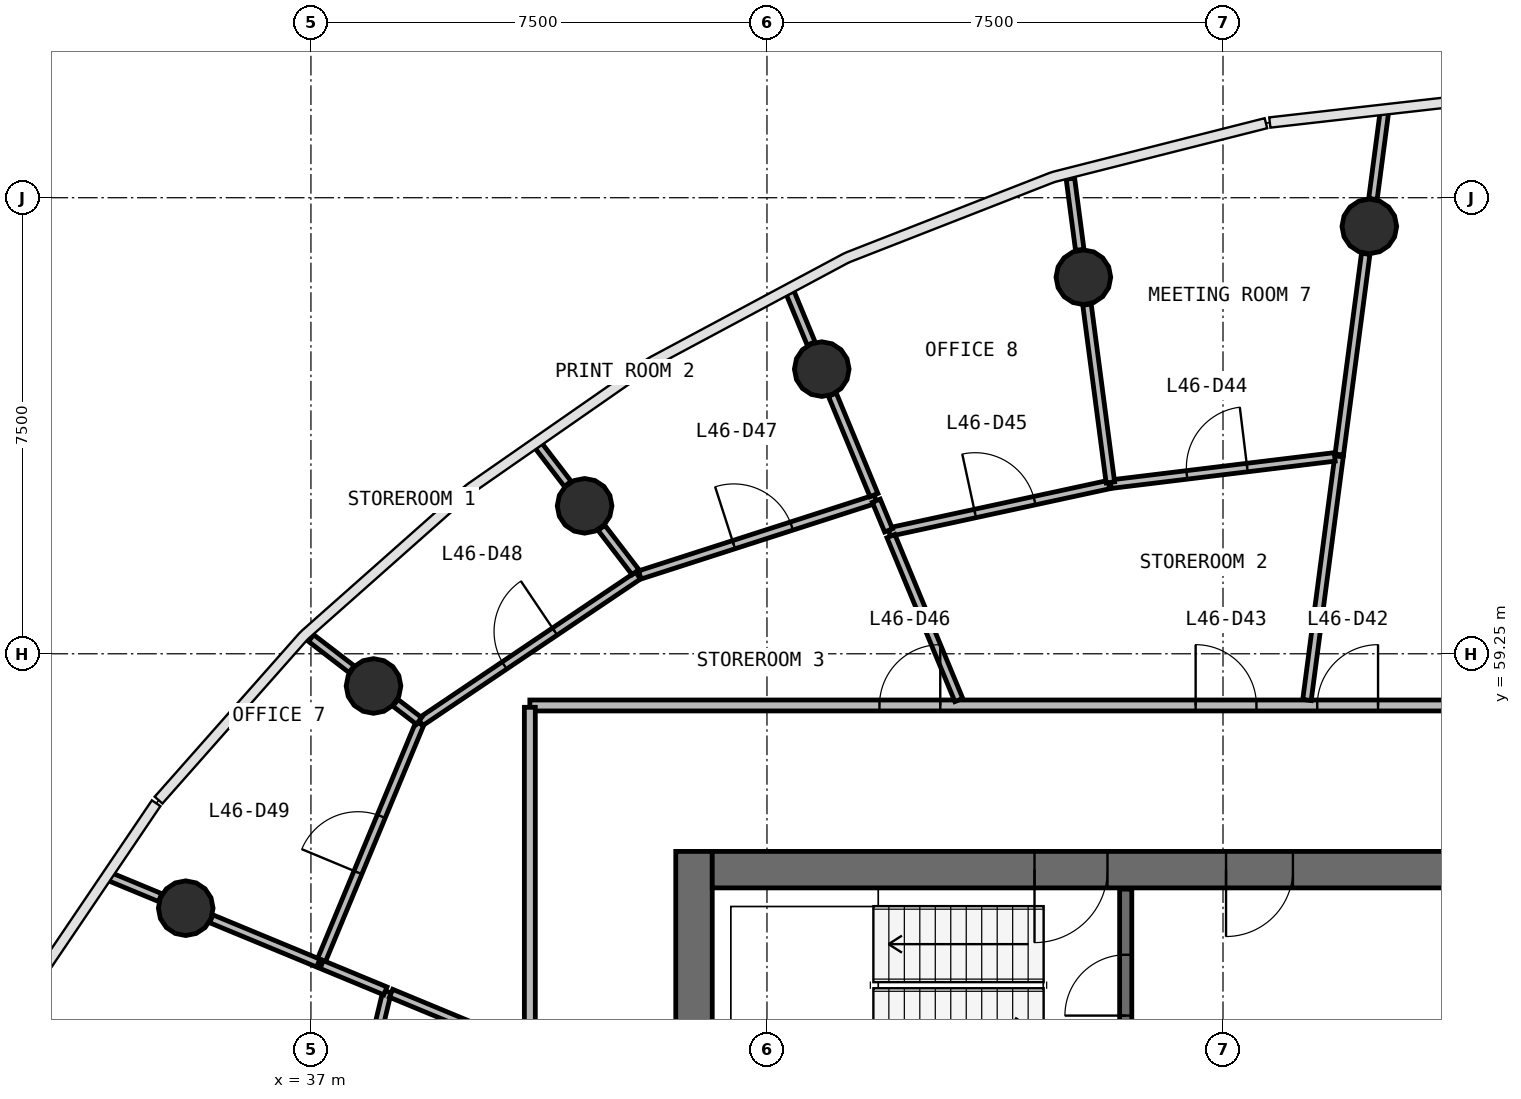
"""IFC4 building model, lengths in metres.
Left out: names, types, materials, properties, quantities, classifications, styles, units other than length and angle.
Written with IfcOpenShell. Run it as: python <this file> out.ifc"""

import sys

from ifc_helpers import new_model, si_unit, direction, frame, frame_2d, origin, origin_2d, place, context, subcontext, project, spatial, rectangle, circle, extrude, source, transform, mapped, element, fill, save


model = new_model("IFC4")
c1 = context("Model", 3, precision=1e-05, world=origin(), true_north=direction((0.0, 1.0)))
c2 = subcontext(c1, "Body", "Model", "MODEL_VIEW")
j1 = project(units=[si_unit("LENGTHUNIT", "METRE"), si_unit("PLANEANGLEUNIT", "RADIAN")], contexts=[c1])
p1 = place(None, origin())
s1 = spatial("IfcSite", under=j1, at=p1, CompositionType="ELEMENT")
p2 = place(p1, origin())
s2 = spatial("IfcBuilding", under=s1, at=p2, CompositionType="ELEMENT")
p3 = place(p2, frame((0.0, 0.0, 191.6)))
s3 = spatial("IfcBuildingStorey", under=s2, at=p3, CompositionType="ELEMENT", Elevation=191.6)
p4 = place(p3, frame((43.3, 56.0, 0.0), z_axis=(0.0, 0.0, 1.0), x_axis=(0.0, -1.0, 0.0)))
e1 = element("IfcWall", 1, at=p4, inside=s3, PredefinedType="SHEAR", context=c2, shape_type="SweptSolid", body=[
    extrude(rectangle(XDim=16.0, YDim=0.6, at=frame_2d((8.0, 0.0))), origin(), (0.0, 0.0, 1.0), 3.9),
])
p5 = place(p4, frame((7.1, 0.0, 0.0)))
e2 = element("IfcOpeningElement", 2, at=p5, cuts=e1, PredefinedType="OPENING", context=c2, shape_type="SweptSolid", body=[
    extrude(rectangle(XDim=1.8, YDim=2.1, at=frame_2d((0.9, 1.05))), frame((0.0, 0.31, 0.0), z_axis=(0.0, -1.0, 0.0), x_axis=(1.0, 0.0, 0.0)), (0.0, 0.0, 1.0), 0.62),
])
p6 = place(p3, frame((60.4, 55.7, 0.0), z_axis=(0.0, 0.0, 1.0), x_axis=(-1.0, 0.0, 0.0)))
e3 = element("IfcWall", 3, at=p6, inside=s3, PredefinedType="SHEAR", context=c2, shape_type="SweptSolid", body=[
    extrude(rectangle(XDim=16.8, YDim=0.6, at=frame_2d((8.4, 0.0))), origin(), (0.0, 0.0, 1.0), 3.9),
])
p7 = place(p6, frame((0.4, 0.0, 0.0)))
e4 = element("IfcOpeningElement", 4, at=p7, cuts=e3, PredefinedType="OPENING", context=c2, shape_type="SweptSolid", body=[
    extrude(rectangle(XDim=1.1, YDim=2.1, at=frame_2d((0.55, 1.05))), frame((0.0, 0.31, 0.0), z_axis=(0.0, -1.0, 0.0), x_axis=(1.0, 0.0, 0.0)), (0.0, 0.0, 1.0), 0.62),
])
p8 = place(p6, frame((10.3, 0.0, 0.0)))
e5 = element("IfcOpeningElement", 5, at=p8, cuts=e3, PredefinedType="OPENING", context=c2, shape_type="SweptSolid", body=[
    extrude(rectangle(XDim=1.2, YDim=2.1, at=frame_2d((0.6, 1.05))), frame((0.0, 0.31, 0.0), z_axis=(0.0, -1.0, 0.0), x_axis=(1.0, 0.0, 0.0)), (0.0, 0.0, 1.0), 0.62),
])
p9 = place(p6, frame((7.25, 0.0, 0.0)))
e6 = element("IfcOpeningElement", 6, at=p9, cuts=e3, PredefinedType="OPENING", context=c2, shape_type="SweptSolid", body=[
    extrude(rectangle(XDim=1.1, YDim=2.1, at=frame_2d((0.55, 1.05))), frame((0.0, 0.31, 0.0), z_axis=(0.0, -1.0, 0.0), x_axis=(1.0, 0.0, 0.0)), (0.0, 0.0, 1.0), 0.62),
])
m1 = source(origin(), c2, "Body", "SweptSolid", [
    extrude(circle(Radius=0.45, at=origin_2d()), origin(), (0.0, 0.0, 1.0), 3.9),
])
for number, where, z_axis, x_axis in (
    (7, (54.406, 66.278, 0.0), (0.0, 0.0, 1.0), (1.0, 0.0, 0.0)),
    (8, (49.704, 65.442, 0.0), (0.0, 0.0, 1.0), (1.0, 0.0, 0.0)),
    (9, (45.401, 63.931, 0.0), (0.0, 0.0, 1.0), (1.0, 0.0, 0.0)),
    (10, (41.501, 61.683, 0.0), (0.0, 0.0, 1.0), (1.0, 0.0, 0.0)),
    (11, (38.029, 58.72, 0.0), (0.0, 0.0, 1.0), (1.0, 0.0, 0.0)),
    (12, (34.941, 55.066, 0.0), (0.0, 0.0, 1.0), (1.0, 0.0, 0.0)),
):
    element("IfcColumn", number, at=place(p3, frame(where, z_axis=z_axis, x_axis=x_axis)), inside=s3, PredefinedType="COLUMN", context=c2, shape_type="MappedRepresentation", body=[
        mapped(m1, transform((0.0, 0.0, 0.0), scale=1.0)),
    ])
p10 = place(p3, frame((50.4, 52.43, 0.0), z_axis=(0.0, 0.0, 1.0), x_axis=(0.0, 1.0, 0.0)))
e13 = element("IfcWall", 13, at=p10, inside=s3, PredefinedType="SOLIDWALL", context=c2, shape_type="SweptSolid", body=[
    extrude(rectangle(XDim=2.95, YDim=0.2, at=frame_2d((1.475, 0.0))), origin(), (0.0, 0.0, 1.0), 3.58),
])
p11 = place(p10, frame((0.87, 0.0, 0.0)))
e14 = element("IfcOpeningElement", 14, at=p11, cuts=e13, PredefinedType="OPENING", context=c2, shape_type="SweptSolid", body=[
    extrude(rectangle(XDim=1.0, YDim=2.1, at=frame_2d((0.5, 1.05))), frame((0.0, 0.11, 0.0), z_axis=(0.0, -1.0, 0.0), x_axis=(1.0, 0.0, 0.0)), (0.0, 0.0, 1.0), 0.22),
])
p12 = place(p3, frame((40.6, 58.4, 0.0), z_axis=(0.0, 0.0, 1.0), x_axis=(1.0, 0.0, 0.0)))
e15 = element("IfcWall", 15, at=p12, inside=s3, PredefinedType="PARTITIONING", context=c2, shape_type="SweptSolid", body=[
    extrude(rectangle(XDim=22.8, YDim=0.18, at=frame_2d((11.4, 0.0))), origin(), (0.0, 0.0, 1.0), 2.88),
])
p13 = place(p12, frame((12.95, 0.0, 0.0)))
e16 = element("IfcOpeningElement", 16, at=p13, cuts=e15, PredefinedType="OPENING", context=c2, shape_type="SweptSolid", body=[
    extrude(rectangle(XDim=1.0, YDim=2.1, at=frame_2d((0.5, 1.05))), frame((0.0, 0.1, 0.0), z_axis=(0.0, -1.0, 0.0), x_axis=(1.0, 0.0, 0.0)), (0.0, 0.0, 1.0), 0.2),
])
p14 = place(p12, frame((10.95, 0.0, 0.0)))
e17 = element("IfcOpeningElement", 17, at=p14, cuts=e15, PredefinedType="OPENING", context=c2, shape_type="SweptSolid", body=[
    extrude(rectangle(XDim=1.0, YDim=2.1, at=frame_2d((0.5, 1.05))), frame((0.0, 0.1, 0.0), z_axis=(0.0, -1.0, 0.0), x_axis=(1.0, 0.0, 0.0)), (0.0, 0.0, 1.0), 0.2),
])
p15 = place(p12, frame((5.75, 0.0, 0.0)))
e18 = element("IfcOpeningElement", 18, at=p15, cuts=e15, PredefinedType="OPENING", context=c2, shape_type="SweptSolid", body=[
    extrude(rectangle(XDim=1.0, YDim=2.1, at=frame_2d((0.5, 1.05))), frame((0.0, 0.1, 0.0), z_axis=(0.0, -1.0, 0.0), x_axis=(1.0, 0.0, 0.0)), (0.0, 0.0, 1.0), 0.2),
])
p16 = place(p3, frame((40.6, 37.63, 0.0), z_axis=(0.0, 0.0, 1.0), x_axis=(0.0, 1.0, 0.0)))
e19 = element("IfcWall", 19, at=p16, inside=s3, PredefinedType="PARTITIONING", context=c2, shape_type="SweptSolid", body=[
    extrude(rectangle(XDim=20.74, YDim=0.18, at=frame_2d((10.37, 0.0))), origin(), (0.0, 0.0, 1.0), 2.88),
])
p17 = place(p16, frame((12.19, 0.0, 0.0)))
e20 = element("IfcOpeningElement", 20, at=p17, cuts=e19, PredefinedType="OPENING", context=c2, shape_type="SweptSolid", body=[
    extrude(rectangle(XDim=0.9, YDim=2.1, at=frame_2d((0.45, 1.05))), frame((0.0, 0.1, 0.0), z_axis=(0.0, -1.0, 0.0), x_axis=(1.0, 0.0, 0.0)), (0.0, 0.0, 1.0), 0.2),
])
p18 = place(p16, frame((9.99, 0.0, 0.0)))
e21 = element("IfcOpeningElement", 21, at=p18, cuts=e19, PredefinedType="OPENING", context=c2, shape_type="SweptSolid", body=[
    extrude(rectangle(XDim=0.9, YDim=2.1, at=frame_2d((0.45, 1.05))), frame((0.0, 0.1, 0.0), z_axis=(0.0, -1.0, 0.0), x_axis=(1.0, 0.0, 0.0)), (0.0, 0.0, 1.0), 0.2),
])
p19 = place(p16, frame((7.69, 0.0, 0.0)))
e22 = element("IfcOpeningElement", 22, at=p19, cuts=e19, PredefinedType="OPENING", context=c2, shape_type="SweptSolid", body=[
    extrude(rectangle(XDim=1.0, YDim=2.1, at=frame_2d((0.5, 1.05))), frame((0.0, 0.1, 0.0), z_axis=(0.0, -1.0, 0.0), x_axis=(1.0, 0.0, 0.0)), (0.0, 0.0, 1.0), 0.2),
])
p20 = place(p3, frame((38.801, 58.128, 0.0), z_axis=(0.0, 0.0, 1.0), x_axis=(0.829508088587, 0.558494700932, 0.0)))
e23 = element("IfcWall", 23, at=p20, inside=s3, PredefinedType="PARTITIONING", context=c2, shape_type="SweptSolid", body=[
    extrude(rectangle(XDim=4.314, YDim=0.14, at=frame_2d((2.157, 0.0))), origin(), (0.0, 0.0, 1.0), 2.88),
])
p21 = place(p20, frame((1.664, 0.0, 0.0)))
e24 = element("IfcOpeningElement", 24, at=p21, cuts=e23, PredefinedType="OPENING", context=c2, shape_type="SweptSolid", body=[
    extrude(rectangle(XDim=1.0, YDim=2.1, at=frame_2d((0.5, 1.05))), frame((0.0, 0.08, 0.0), z_axis=(0.0, -1.0, 0.0), x_axis=(1.0, 0.0, 0.0)), (0.0, 0.0, 1.0), 0.16),
])
p22 = place(p3, frame((37.149, 54.152, 0.0), z_axis=(0.0, 0.0, 1.0), x_axis=(0.383800347623, 0.923416099689, 0.0)))
e25 = element("IfcWall", 25, at=p22, inside=s3, PredefinedType="PARTITIONING", context=c2, shape_type="SweptSolid", body=[
    extrude(rectangle(XDim=4.276, YDim=0.14, at=frame_2d((2.138, 0.0))), origin(), (0.0, 0.0, 1.0), 2.88),
])
p23 = place(p22, frame((1.626, 0.0, 0.0)))
e26 = element("IfcOpeningElement", 26, at=p23, cuts=e25, PredefinedType="OPENING", context=c2, shape_type="SweptSolid", body=[
    extrude(rectangle(XDim=1.0, YDim=2.1, at=frame_2d((0.5, 1.05))), frame((0.0, 0.08, 0.0), z_axis=(0.0, -1.0, 0.0), x_axis=(1.0, 0.0, 0.0)), (0.0, 0.0, 1.0), 0.16),
])
p24 = place(p3, frame((53.381, 58.49, 0.0), z_axis=(0.0, 0.0, 1.0), x_axis=(0.130493581912, 0.991449154057, 0.0)))
e27 = element("IfcWall", 27, at=p24, inside=s3, PredefinedType="PARTITIONING", context=c2, shape_type="SweptSolid", body=[
    extrude(rectangle(XDim=4.041, YDim=0.14, at=frame_2d((2.021, 0.0))), origin(), (0.0, 0.0, 1.0), 2.88),
])
p25 = place(p3, frame((42.408, 60.546, 0.0), z_axis=(0.0, 0.0, 1.0), x_axis=(0.951875671907, 0.30648442902, 0.0)))
e28 = element("IfcWall", 28, at=p25, inside=s3, PredefinedType="PARTITIONING", context=c2, shape_type="SweptSolid", body=[
    extrude(rectangle(XDim=4.074, YDim=0.14, at=frame_2d((2.037, 0.0))), origin(), (0.0, 0.0, 1.0), 2.88),
])
p26 = place(p25, frame((1.624, 0.0, 0.0)))
e29 = element("IfcOpeningElement", 29, at=p26, cuts=e28, PredefinedType="OPENING", context=c2, shape_type="SweptSolid", body=[
    extrude(rectangle(XDim=1.0, YDim=2.1, at=frame_2d((0.5, 1.05))), frame((0.0, 0.08, 0.0), z_axis=(0.0, -1.0, 0.0), x_axis=(1.0, 0.0, 0.0)), (0.0, 0.0, 1.0), 0.16),
])
p27 = place(p3, frame((38.252, 53.694, 0.0), z_axis=(0.0, 0.0, 1.0), x_axis=(-0.232699959373, -0.972548574061, 0.0)))
e30 = element("IfcWall", 30, at=p27, inside=s3, PredefinedType="PARTITIONING", context=c2, shape_type="SweptSolid", body=[
    extrude(rectangle(XDim=3.842, YDim=0.14, at=frame_2d((1.921, 0.0))), origin(), (0.0, 0.0, 1.0), 2.88),
])
p28 = place(p3, frame((50.152, 62.039, 0.0), z_axis=(0.0, 0.0, 1.0), x_axis=(0.992659556224, 0.120942157407, 0.0)))
e31 = element("IfcWall", 31, at=p28, inside=s3, PredefinedType="PARTITIONING", context=c2, shape_type="SweptSolid", body=[
    extrude(rectangle(XDim=3.712, YDim=0.14, at=frame_2d((1.856, 0.0))), origin(), (0.0, 0.0, 1.0), 2.88),
])
p29 = place(p28, frame((1.262, 0.0, 0.0)))
e32 = element("IfcOpeningElement", 32, at=p29, cuts=e31, PredefinedType="OPENING", context=c2, shape_type="SweptSolid", body=[
    extrude(rectangle(XDim=1.0, YDim=2.1, at=frame_2d((0.5, 1.05))), frame((0.0, 0.08, 0.0), z_axis=(0.0, -1.0, 0.0), x_axis=(1.0, 0.0, 0.0)), (0.0, 0.0, 1.0), 0.16),
])
p30 = place(p3, frame((46.511, 61.251, 0.0), z_axis=(0.0, 0.0, 1.0), x_axis=(0.977404204457, 0.211378856818, 0.0)))
e33 = element("IfcWall", 33, at=p30, inside=s3, PredefinedType="PARTITIONING", context=c2, shape_type="SweptSolid", body=[
    extrude(rectangle(XDim=3.695, YDim=0.14, at=frame_2d((1.847, 0.0))), origin(), (0.0, 0.0, 1.0), 2.88),
])
p31 = place(p30, frame((1.445, 0.0, 0.0)))
e34 = element("IfcOpeningElement", 34, at=p31, cuts=e33, PredefinedType="OPENING", context=c2, shape_type="SweptSolid", body=[
    extrude(rectangle(XDim=1.0, YDim=2.1, at=frame_2d((0.5, 1.05))), frame((0.0, 0.08, 0.0), z_axis=(0.0, -1.0, 0.0), x_axis=(1.0, 0.0, 0.0)), (0.0, 0.0, 1.0), 0.16),
])
p32 = place(p3, frame((53.912, 62.526, 0.0), z_axis=(0.0, 0.0, 1.0), x_axis=(0.130583483351, 0.991437317169, 0.0)))
e35 = element("IfcWall", 35, at=p32, inside=s3, PredefinedType="PARTITIONING", context=c2, shape_type="SweptSolid", body=[
    extrude(rectangle(XDim=3.33, YDim=0.14, at=frame_2d((1.665, 0.0))), origin(), (0.0, 0.0, 1.0), 2.88),
])
p33 = place(p3, frame((47.655, 58.49, 0.0), z_axis=(0.0, 0.0, 1.0), x_axis=(-0.382630142658, 0.92390160403, 0.0)))
e36 = element("IfcWall", 36, at=p33, inside=s3, PredefinedType="PARTITIONING", context=c2, shape_type="SweptSolid", body=[
    extrude(rectangle(XDim=2.918, YDim=0.14, at=frame_2d((1.459, 0.0))), origin(), (0.0, 0.0, 1.0), 2.88),
])
p34 = place(p3, frame((50.148, 62.069, 0.0), z_axis=(0.0, 0.0, 1.0), x_axis=(-0.130493066125, 0.991449221944, 0.0)))
e37 = element("IfcWall", 37, at=p34, inside=s3, PredefinedType="PARTITIONING", context=c2, shape_type="SweptSolid", body=[
    extrude(rectangle(XDim=2.948, YDim=0.14, at=frame_2d((1.474, 0.0))), origin(), (0.0, 0.0, 1.0), 2.88),
])
p35 = place(p3, frame((40.51, 52.759, 0.0), z_axis=(0.0, 0.0, 1.0), x_axis=(-0.923887665709, 0.3826637965, 0.0)))
e38 = element("IfcWall", 38, at=p35, inside=s3, PredefinedType="PARTITIONING", context=c2, shape_type="SweptSolid", body=[
    extrude(rectangle(XDim=2.373, YDim=0.14, at=frame_2d((1.187, 0.0))), origin(), (0.0, 0.0, 1.0), 2.88),
])
p36 = place(p3, frame((37.121, 54.163, 0.0), z_axis=(0.0, 0.0, 1.0), x_axis=(-0.92388250353, 0.382676259612, 0.0)))
e39 = element("IfcWall", 39, at=p36, inside=s3, PredefinedType="PARTITIONING", context=c2, shape_type="SweptSolid", body=[
    extrude(rectangle(XDim=1.905, YDim=0.14, at=frame_2d((0.953, 0.0))), origin(), (0.0, 0.0, 1.0), 2.88),
])
p37 = place(p3, frame((46.259, 61.86, 0.0), z_axis=(0.0, 0.0, 1.0), x_axis=(-0.382713681356, 0.923867002389, 0.0)))
e40 = element("IfcWall", 40, at=p37, inside=s3, PredefinedType="PARTITIONING", context=c2, shape_type="SweptSolid", body=[
    extrude(rectangle(XDim=1.787, YDim=0.14, at=frame_2d((0.894, 0.0))), origin(), (0.0, 0.0, 1.0), 2.88),
])
p38 = place(p3, frame((54.466, 66.729, 0.0), z_axis=(0.0, 0.0, 1.0), x_axis=(0.130472090904, 0.991451982445, 0.0)))
e41 = element("IfcWall", 41, at=p38, inside=s3, PredefinedType="PARTITIONING", context=c2, shape_type="SweptSolid", body=[
    extrude(rectangle(XDim=1.437, YDim=0.14, at=frame_2d((0.719, 0.0))), origin(), (0.0, 0.0, 1.0), 2.88),
])
p39 = place(p3, frame((38.225, 53.706, 0.0), z_axis=(0.0, 0.0, 1.0), x_axis=(-0.923851616337, 0.382750821021, 0.0)))
e42 = element("IfcWall", 42, at=p39, inside=s3, PredefinedType="PARTITIONING", context=c2, shape_type="SweptSolid", body=[
    extrude(rectangle(XDim=1.135, YDim=0.14, at=frame_2d((0.567, 0.0))), origin(), (0.0, 0.0, 1.0), 2.88),
])
p40 = place(p3, frame((49.644, 65.893, 0.0), z_axis=(0.0, 0.0, 1.0), x_axis=(-0.130470558533, 0.9914521841, 0.0)))
e43 = element("IfcWall", 43, at=p40, inside=s3, PredefinedType="PARTITIONING", context=c2, shape_type="SweptSolid", body=[
    extrude(rectangle(XDim=1.181, YDim=0.14, at=frame_2d((0.59, 0.0))), origin(), (0.0, 0.0, 1.0), 2.88),
])
p41 = place(p3, frame((42.337, 60.593, 0.0), z_axis=(0.0, 0.0, 1.0), x_axis=(-0.60883820701, 0.793294420555, 0.0)))
e44 = element("IfcWall", 44, at=p41, inside=s3, PredefinedType="PARTITIONING", context=c2, shape_type="SweptSolid", body=[
    extrude(rectangle(XDim=0.92, YDim=0.14, at=frame_2d((0.46, 0.0))), origin(), (0.0, 0.0, 1.0), 2.88),
])
p42 = place(p3, frame((45.227, 64.352, 0.0), z_axis=(0.0, 0.0, 1.0), x_axis=(-0.382645109605, 0.923895405387, 0.0)))
e45 = element("IfcWall", 45, at=p42, inside=s3, PredefinedType="PARTITIONING", context=c2, shape_type="SweptSolid", body=[
    extrude(rectangle(XDim=0.907, YDim=0.14, at=frame_2d((0.453, 0.0))), origin(), (0.0, 0.0, 1.0), 2.88),
])
p43 = place(p3, frame((34.52, 55.24, 0.0), z_axis=(0.0, 0.0, 1.0), x_axis=(-0.923869811138, 0.382706900994, 0.0)))
e46 = element("IfcWall", 46, at=p43, inside=s3, PredefinedType="PARTITIONING", context=c2, shape_type="SweptSolid", body=[
    extrude(rectangle(XDim=0.891, YDim=0.14, at=frame_2d((0.445, 0.0))), origin(), (0.0, 0.0, 1.0), 2.88),
])
p44 = place(p3, frame((37.668, 58.997, 0.0), z_axis=(0.0, 0.0, 1.0), x_axis=(-0.793390985662, 0.608712365466, 0.0)))
e47 = element("IfcWall", 47, at=p44, inside=s3, PredefinedType="PARTITIONING", context=c2, shape_type="SweptSolid", body=[
    extrude(rectangle(XDim=0.839, YDim=0.14, at=frame_2d((0.42, 0.0))), origin(), (0.0, 0.0, 1.0), 2.88),
])
p45 = place(p3, frame((41.224, 62.044, 0.0), z_axis=(0.0, 0.0, 1.0), x_axis=(-0.608908709281, 0.79324030644, 0.0)))
e48 = element("IfcWall", 48, at=p45, inside=s3, PredefinedType="PARTITIONING", context=c2, shape_type="SweptSolid", body=[
    extrude(rectangle(XDim=0.795, YDim=0.14, at=frame_2d((0.397, 0.0))), origin(), (0.0, 0.0, 1.0), 2.88),
])
p46 = place(p3, frame((46.5, 61.279, 0.0), z_axis=(0.0, 0.0, 1.0), x_axis=(-0.382447097883, 0.923977390049, 0.0)))
e49 = element("IfcWall", 49, at=p46, inside=s3, PredefinedType="PARTITIONING", context=c2, shape_type="SweptSolid", body=[
    extrude(rectangle(XDim=0.528, YDim=0.14, at=frame_2d((0.264, 0.0))), origin(), (0.0, 0.0, 1.0), 2.88),
])
p47 = place(p3, frame((38.777, 58.146, 0.0), z_axis=(0.0, 0.0, 1.0), x_axis=(-0.793236381763, 0.608913822021, 0.0)))
e50 = element("IfcWall", 50, at=p47, inside=s3, PredefinedType="PARTITIONING", context=c2, shape_type="SweptSolid", body=[
    extrude(rectangle(XDim=0.489, YDim=0.14, at=frame_2d((0.244, 0.0))), origin(), (0.0, 0.0, 1.0), 2.88),
])
m2 = source(origin(), c2, "Body", "SweptSolid", [
    extrude(rectangle(XDim=1.2, YDim=2.1, at=frame_2d((0.6, 1.05))), frame((0.0, 0.025, 0.0), z_axis=(0.0, -1.0, 0.0), x_axis=(1.0, 0.0, 0.0)), (0.0, 0.0, 1.0), 0.05),
])
p48 = place(p8, origin())
e51 = element("IfcDoor", 51, at=p48, inside=s3, OperationType="SINGLE_SWING_RIGHT", PredefinedType="DOOR", context=c2, shape_type="MappedRepresentation", body=[
    mapped(m2, transform((0.0, 0.0, 0.0), scale=1.0)),
])
fill(e5, e51)
m3 = source(origin(), c2, "Body", "SweptSolid", [
    extrude(rectangle(XDim=1.0, YDim=2.1, at=frame_2d((0.5, 1.05))), frame((0.0, 0.025, 0.0), z_axis=(0.0, -1.0, 0.0), x_axis=(1.0, 0.0, 0.0)), (0.0, 0.0, 1.0), 0.05),
])
p49 = place(p11, origin())
e52 = element("IfcDoor", 52, at=p49, inside=s3, OperationType="SINGLE_SWING_LEFT", PredefinedType="DOOR", context=c2, shape_type="MappedRepresentation", body=[
    mapped(m3, transform((0.0, 0.0, 0.0), scale=1.0)),
])
fill(e14, e52)
m4 = source(origin(), c2, "Body", "SweptSolid", [
    extrude(rectangle(XDim=1.1, YDim=2.1, at=frame_2d((0.55, 1.05))), frame((0.0, 0.025, 0.0), z_axis=(0.0, -1.0, 0.0), x_axis=(1.0, 0.0, 0.0)), (0.0, 0.0, 1.0), 0.05),
])
p50 = place(p9, origin())
e53 = element("IfcDoor", 53, at=p50, inside=s3, OperationType="SINGLE_SWING_RIGHT", PredefinedType="DOOR", context=c2, shape_type="MappedRepresentation", body=[
    mapped(m4, transform((0.0, 0.0, 0.0), scale=1.0)),
])
fill(e6, e53)
m5 = source(origin(), c2, "Body", "SweptSolid", [
    extrude(rectangle(XDim=1.0, YDim=2.1, at=frame_2d((0.5, 1.05))), frame((0.0, 0.025, 0.0), z_axis=(0.0, -1.0, 0.0), x_axis=(1.0, 0.0, 0.0)), (0.0, 0.0, 1.0), 0.05),
])
p51 = place(p13, origin())
e54 = element("IfcDoor", 54, at=p51, inside=s3, OperationType="SINGLE_SWING_RIGHT", PredefinedType="DOOR", context=c2, shape_type="MappedRepresentation", body=[
    mapped(m5, transform((0.0, 0.0, 0.0), scale=1.0)),
])
fill(e16, e54)
p52 = place(p14, origin())
e55 = element("IfcDoor", 55, at=p52, inside=s3, OperationType="SINGLE_SWING_LEFT", PredefinedType="DOOR", context=c2, shape_type="MappedRepresentation", body=[
    mapped(m5, transform((0.0, 0.0, 0.0), scale=1.0)),
])
fill(e17, e55)
p53 = place(p29, origin())
e56 = element("IfcDoor", 56, at=p53, inside=s3, OperationType="SINGLE_SWING_RIGHT", PredefinedType="DOOR", context=c2, shape_type="MappedRepresentation", body=[
    mapped(m5, transform((0.0, 0.0, 0.0), scale=1.0)),
])
fill(e32, e56)
p54 = place(p31, origin())
e57 = element("IfcDoor", 57, at=p54, inside=s3, OperationType="SINGLE_SWING_LEFT", PredefinedType="DOOR", context=c2, shape_type="MappedRepresentation", body=[
    mapped(m5, transform((0.0, 0.0, 0.0), scale=1.0)),
])
fill(e34, e57)
p55 = place(p15, origin())
e58 = element("IfcDoor", 58, at=p55, inside=s3, OperationType="SINGLE_SWING_RIGHT", PredefinedType="DOOR", context=c2, shape_type="MappedRepresentation", body=[
    mapped(m5, transform((0.0, 0.0, 0.0), scale=1.0)),
])
fill(e18, e58)
p56 = place(p26, origin())
e59 = element("IfcDoor", 59, at=p56, inside=s3, OperationType="SINGLE_SWING_LEFT", PredefinedType="DOOR", context=c2, shape_type="MappedRepresentation", body=[
    mapped(m5, transform((0.0, 0.0, 0.0), scale=1.0)),
])
fill(e29, e59)
p57 = place(p21, origin())
e60 = element("IfcDoor", 60, at=p57, inside=s3, OperationType="SINGLE_SWING_RIGHT", PredefinedType="DOOR", context=c2, shape_type="MappedRepresentation", body=[
    mapped(m5, transform((0.0, 0.0, 0.0), scale=1.0)),
])
fill(e24, e60)
p58 = place(p23, origin())
e61 = element("IfcDoor", 61, at=p58, inside=s3, OperationType="SINGLE_SWING_LEFT", PredefinedType="DOOR", context=c2, shape_type="MappedRepresentation", body=[
    mapped(m5, transform((0.0, 0.0, 0.0), scale=1.0)),
])
fill(e26, e61)
save(model, sys.argv[1])
